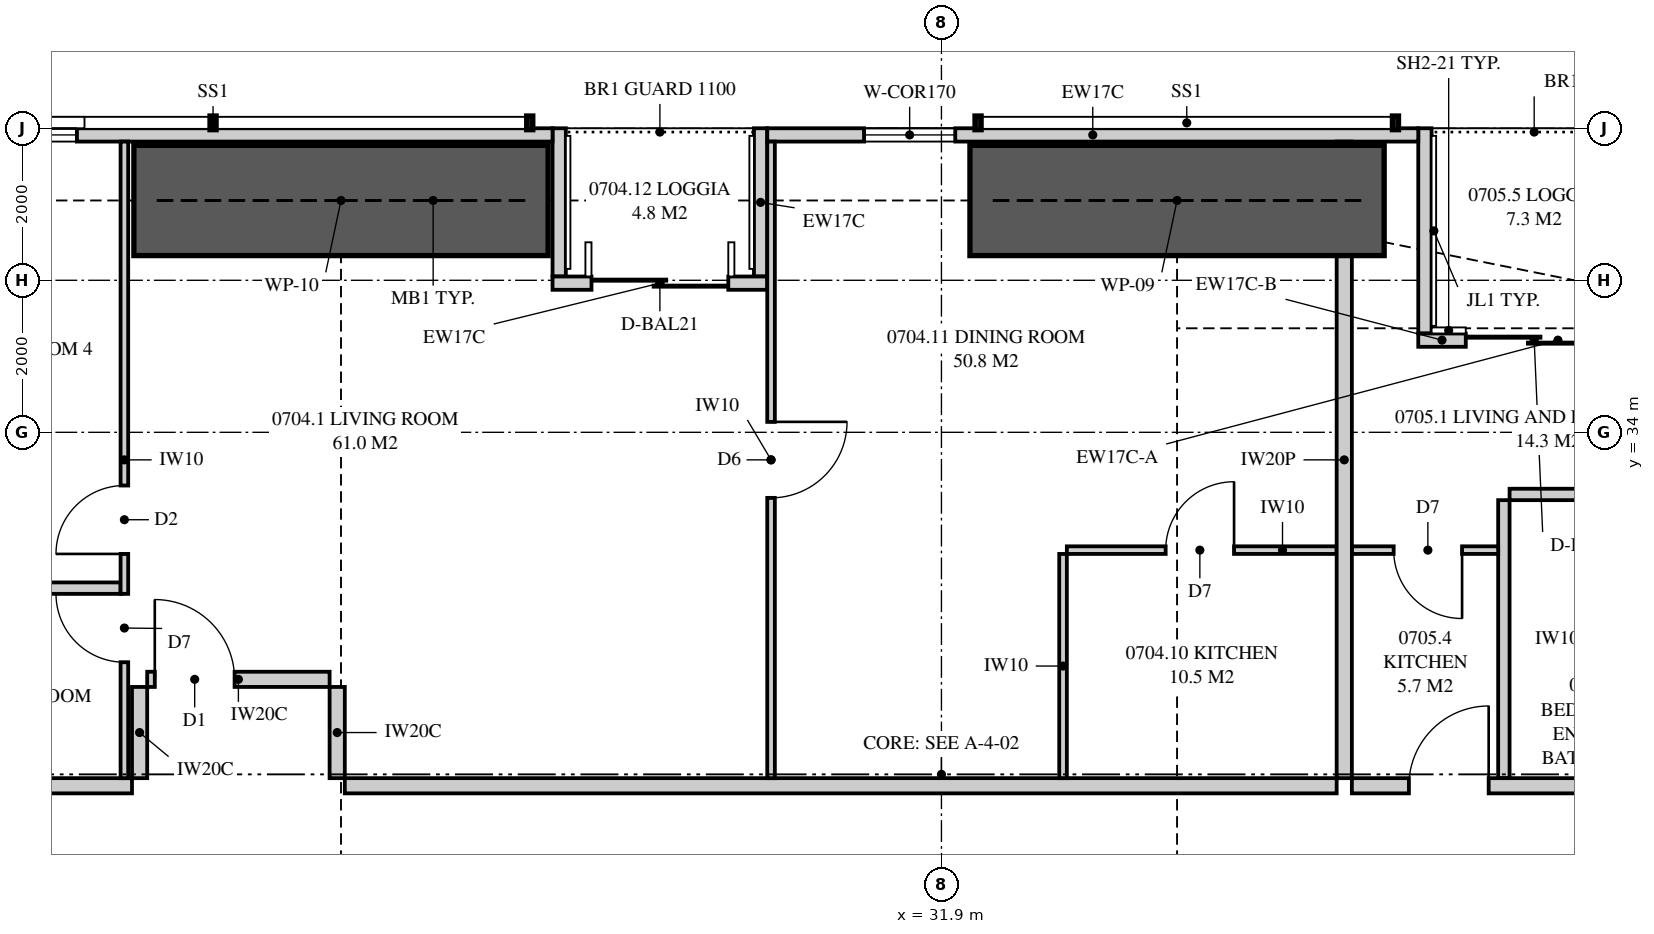
"""IFC4 building model, lengths in metres.
Left out: names, types, materials, properties, quantities, classifications, styles, units other than length and angle.
Written with IfcOpenShell. Run it as: python <this file> out.ifc"""

import sys

from ifc_helpers import new_model, si_unit, direction, frame, frame_2d, origin, place, context, subcontext, project, spatial, polyline, rectangle, outline, extrude, element, fill, save


model = new_model("IFC4")
c1 = context("Model", 3, precision=1e-05, world=origin(), true_north=direction((0.0, 1.0)))
c2 = subcontext(c1, "Body", "Model", "MODEL_VIEW")
j1 = project(units=[si_unit("LENGTHUNIT", "METRE"), si_unit("PLANEANGLEUNIT", "RADIAN")], contexts=[c1])
p1 = place(None, origin())
s1 = spatial("IfcSite", under=j1, at=p1, CompositionType="ELEMENT")
p2 = place(p1, origin())
s2 = spatial("IfcBuilding", under=s1, at=p2, CompositionType="ELEMENT")
p3 = place(p2, frame((0.0, 0.0, 31.05)))
s3 = spatial("IfcBuildingStorey", under=s2, at=p3, CompositionType="ELEMENT", Elevation=31.05)
p4 = place(p3, frame((38.174, 37.913, 0.0), z_axis=(0.0, 0.0, 1.0), x_axis=(-1.0, 0.0, 0.0)))
e1 = element("IfcWall", 1, at=p4, inside=s3, PredefinedType="SOLIDWALL", context=c2, shape_type="SweptSolid", body=[
    extrude(outline(polyline([(0.0, 0.0), (8.565, 0.0), (8.565, 2.15), (3.174, 2.15), (3.174, 3.11), (3.018, 3.11), (3.018, 2.15), (2.97, 2.15), (2.97, 3.11), (0.0, 3.11), (0.0, 0.0)])), frame((0.0, 0.087, 0.0), z_axis=(0.0, -1.0, 0.0), x_axis=(1.0, 0.0, 0.0)), (0.0, 0.0, 1.0), 0.175),
])
p5 = place(p4, frame((6.092, 0.0, 0.4)))
e2 = element("IfcOpeningElement", 2, at=p5, cuts=e1, PredefinedType="OPENING", context=c2, shape_type="SweptSolid", body=[
    extrude(rectangle(XDim=1.2, YDim=1.7, at=frame_2d((0.6, 0.85))), frame((0.0, 0.097, 0.0), z_axis=(0.0, -1.0, 0.0), x_axis=(1.0, 0.0, 0.0)), (0.0, 0.0, 1.0), 0.195),
])
p6 = place(p3, frame((26.783, 37.913, 0.0), z_axis=(0.0, 0.0, 1.0), x_axis=(-1.0, 0.0, 0.0)))
e3 = element("IfcWall", 3, at=p6, inside=s3, PredefinedType="SOLIDWALL", context=c2, shape_type="SweptSolid", body=[
    extrude(outline(polyline([(0.0, 0.0), (21.732, 0.0), (21.732, 3.11), (13.987, 3.11), (13.987, 2.15), (13.939, 2.15), (13.939, 3.11), (13.783, 3.11), (13.783, 2.15), (0.0, 2.15), (0.0, 0.0)])), frame((0.0, 0.087, 0.0), z_axis=(0.0, -1.0, 0.0), x_axis=(1.0, 0.0, 0.0)), (0.0, 0.0, 1.0), 0.175),
])
p7 = place(p6, frame((6.258, 0.0, 0.4)))
e4 = element("IfcOpeningElement", 4, at=p7, cuts=e3, PredefinedType="OPENING", context=c2, shape_type="SweptSolid", body=[
    extrude(rectangle(XDim=1.8, YDim=1.7, at=frame_2d((0.9, 0.85))), frame((0.0, 0.097, 0.0), z_axis=(0.0, -1.0, 0.0), x_axis=(1.0, 0.0, 0.0)), (0.0, 0.0, 1.0), 0.195),
])
p8 = place(p6, frame((9.126, 0.0, 0.4)))
e5 = element("IfcOpeningElement", 5, at=p8, cuts=e3, PredefinedType="OPENING", context=c2, shape_type="SweptSolid", body=[
    extrude(rectangle(XDim=1.8, YDim=1.7, at=frame_2d((0.9, 0.85))), frame((0.0, 0.097, 0.0), z_axis=(0.0, -1.0, 0.0), x_axis=(1.0, 0.0, 0.0)), (0.0, 0.0, 1.0), 0.195),
])
p9 = place(p6, frame((16.613, 0.0, 0.4)))
e6 = element("IfcOpeningElement", 6, at=p9, cuts=e3, PredefinedType="OPENING", context=c2, shape_type="SweptSolid", body=[
    extrude(rectangle(XDim=1.8, YDim=1.7, at=frame_2d((0.9, 0.85))), frame((0.0, 0.097, 0.0), z_axis=(0.0, -1.0, 0.0), x_axis=(1.0, 0.0, 0.0)), (0.0, 0.0, 1.0), 0.195),
])
p10 = place(p3, frame((41.224, 35.212, 0.0), z_axis=(0.0, 0.0, 1.0), x_axis=(-1.0, 0.0, 0.0)))
e7 = element("IfcWall", 7, at=p10, inside=s3, PredefinedType="SOLIDWALL", context=c2, shape_type="SweptSolid", body=[
    extrude(rectangle(XDim=2.425, YDim=0.175, at=frame_2d((1.212, 0.0))), origin(), (0.0, 0.0, 1.0), 2.15),
])
p11 = place(p10, frame((0.625, 0.0, 0.0)))
e8 = element("IfcOpeningElement", 8, at=p11, cuts=e7, PredefinedType="OPENING", context=c2, shape_type="SweptSolid", body=[
    extrude(rectangle(XDim=1.8, YDim=2.1, at=frame_2d((0.9, 1.05))), frame((0.0, 0.097, 0.0), z_axis=(0.0, -1.0, 0.0), x_axis=(1.0, 0.0, 0.0)), (0.0, 0.0, 1.0), 0.195),
])
p12 = place(p3, frame((38.799, 35.212, 0.0), z_axis=(0.0, 0.0, 1.0), x_axis=(-1.0, 0.0, 0.0)))
e9 = element("IfcWall", 9, at=p12, inside=s3, PredefinedType="SOLIDWALL", context=c2, shape_type="SweptSolid", body=[
    extrude(rectangle(XDim=0.625, YDim=0.175, at=frame_2d((0.312, 0.0))), origin(), (0.0, 0.0, 1.0), 2.51),
])
p13 = place(p3, frame((38.261, 38.0, 0.0), z_axis=(0.0, 0.0, 1.0), x_axis=(0.0, -1.0, 0.0)))
e10 = element("IfcWall", 10, at=p13, inside=s3, PredefinedType="SOLIDWALL", context=c2, shape_type="SweptSolid", body=[
    extrude(outline(polyline([(0.0, 0.0), (2.7, 0.0), (2.7, 2.51), (2.439, 2.51), (2.439, 2.15), (0.772, 2.15), (0.772, 3.11), (0.0, 3.11), (0.0, 0.0)])), frame((0.0, 0.087, 0.0), z_axis=(0.0, -1.0, 0.0), x_axis=(1.0, 0.0, 0.0)), (0.0, 0.0, 1.0), 0.175),
])
p14 = place(p3, frame((29.608, 35.962, 0.0), z_axis=(0.0, 0.0, 1.0), x_axis=(-1.0, 0.0, 0.0)))
e11 = element("IfcWall", 11, at=p14, inside=s3, PredefinedType="SOLIDWALL", context=c2, shape_type="SweptSolid", body=[
    extrude(rectangle(XDim=2.825, YDim=0.175, at=frame_2d((1.413, 0.0))), origin(), (0.0, 0.0, 1.0), 3.11),
])
p15 = place(p14, frame((0.512, 0.0, 0.0)))
e12 = element("IfcOpeningElement", 12, at=p15, cuts=e11, PredefinedType="OPENING", context=c2, shape_type="SweptSolid", body=[
    extrude(rectangle(XDim=1.8, YDim=2.1, at=frame_2d((0.9, 1.05))), frame((0.0, 0.097, 0.0), z_axis=(0.0, -1.0, 0.0), x_axis=(1.0, 0.0, 0.0)), (0.0, 0.0, 1.0), 0.195),
])
for number, where, z_axis, x_axis in (
    (13, (29.521, 38.0, 0.0), (0.0, 0.0, 1.0), (0.0, -1.0, 0.0)),
    (14, (26.871, 38.0, 0.0), (0.0, 0.0, 1.0), (0.0, -1.0, 0.0)),
):
    element("IfcWall", number, at=place(p3, frame(where, z_axis=z_axis, x_axis=x_axis)), inside=s3, PredefinedType="SOLIDWALL", context=c2, shape_type="SweptSolid", body=[
        extrude(outline(polyline([(0.0, 0.0), (1.95, 0.0), (1.95, 3.11), (1.75, 3.11), (1.75, 2.15), (0.15, 2.15), (0.15, 3.11), (0.0, 3.11), (0.0, 0.0)])), frame((0.0, 0.087, 0.0), z_axis=(0.0, -1.0, 0.0), x_axis=(1.0, 0.0, 0.0)), (0.0, 0.0, 1.0), 0.175),
    ])
p16 = place(p3, frame((37.2, 37.825, 0.0), z_axis=(0.0, 0.0, 1.0), x_axis=(0.0, -1.0, 0.0)))
e15 = element("IfcWall", 15, at=p16, inside=s3, PredefinedType="PARTITIONING", context=c2, shape_type="SweptSolid", body=[
    extrude(outline(polyline([(0.0, 0.0), (8.375, 0.0), (8.375, 3.11), (3.766, 3.11), (3.766, 2.51), (2.145, 2.51), (2.145, 2.15), (0.289, 2.15), (0.289, 3.11), (0.0, 3.11), (0.0, 0.0)])), frame((0.0, 0.1, 0.0), z_axis=(0.0, -1.0, 0.0), x_axis=(1.0, 0.0, 0.0)), (0.0, 0.0, 1.0), 0.2),
])
p17 = place(p3, frame((17.725, 29.35, 0.0), z_axis=(0.0, 0.0, 1.0), x_axis=(1.0, 0.0, 0.0)))
e16 = element("IfcWall", 16, at=p17, inside=s3, PredefinedType="PARTITIONING", context=c2, shape_type="SweptSolid", body=[
    extrude(rectangle(XDim=3.525, YDim=0.2, at=frame_2d((1.762, 0.0))), origin(), (0.0, 0.0, 1.0), 3.11),
])
p18 = place(p3, frame((21.15, 37.825, 0.0), z_axis=(0.0, 0.0, 1.0), x_axis=(0.0, -1.0, 0.0)))
e17 = element("IfcWall", 17, at=p18, inside=s3, PredefinedType="PARTITIONING", context=c2, shape_type="SweptSolid", body=[
    extrude(outline(polyline([(0.0, 0.0), (8.375, 0.0), (8.375, 3.11), (1.635, 3.11), (1.635, 2.15), (0.0, 2.15), (0.0, 3.11), (0.0, 0.0)])), frame((0.0, 0.05, 0.0), z_axis=(0.0, -1.0, 0.0), x_axis=(1.0, 0.0, 0.0)), (0.0, 0.0, 1.0), 0.1),
])
p19 = place(p18, frame((4.525, 0.0, 0.0)))
e18 = element("IfcOpeningElement", 18, at=p19, cuts=e17, PredefinedType="OPENING", context=c2, shape_type="SweptSolid", body=[
    extrude(rectangle(XDim=0.9, YDim=2.1, at=frame_2d((0.45, 1.05))), frame((0.0, 0.06, 0.0), z_axis=(0.0, -1.0, 0.0), x_axis=(1.0, 0.0, 0.0)), (0.0, 0.0, 1.0), 0.12),
])
p20 = place(p18, frame((5.95, 0.0, 0.0)))
e19 = element("IfcOpeningElement", 19, at=p20, cuts=e17, PredefinedType="OPENING", context=c2, shape_type="SweptSolid", body=[
    extrude(rectangle(XDim=0.9, YDim=2.1, at=frame_2d((0.45, 1.05))), frame((0.0, 0.06, 0.0), z_axis=(0.0, -1.0, 0.0), x_axis=(1.0, 0.0, 0.0)), (0.0, 0.0, 1.0), 0.12),
])
p21 = place(p3, frame((18.15, 31.95, 0.0), z_axis=(0.0, 0.0, 1.0), x_axis=(1.0, 0.0, 0.0)))
e20 = element("IfcWall", 20, at=p21, inside=s3, PredefinedType="PLUMBINGWALL", context=c2, shape_type="SweptSolid", body=[
    extrude(rectangle(XDim=2.95, YDim=0.15, at=frame_2d((1.475, 0.0))), origin(), (0.0, 0.0, 1.0), 3.11),
])
p22 = place(p3, frame((33.55, 32.45, 0.0), z_axis=(0.0, 0.0, 1.0), x_axis=(1.0, 0.0, 0.0)))
e21 = element("IfcWall", 21, at=p22, inside=s3, PredefinedType="PARTITIONING", context=c2, shape_type="SweptSolid", body=[
    extrude(outline(polyline([(0.0, 0.0), (3.55, 0.0), (3.55, 3.11), (1.737, 3.11), (1.737, 2.541), (1.163, 2.541), (1.163, 3.11), (0.0, 3.11), (0.0, 0.0)])), frame((0.0, 0.05, 0.0), z_axis=(0.0, -1.0, 0.0), x_axis=(1.0, 0.0, 0.0)), (0.0, 0.0, 1.0), 0.1),
])
p23 = place(p22, frame((1.3, 0.0, 0.0)))
e22 = element("IfcOpeningElement", 22, at=p23, cuts=e21, PredefinedType="OPENING", context=c2, shape_type="SweptSolid", body=[
    extrude(rectangle(XDim=0.9, YDim=2.1, at=frame_2d((0.45, 1.05))), frame((0.0, 0.06, 0.0), z_axis=(0.0, -1.0, 0.0), x_axis=(1.0, 0.0, 0.0)), (0.0, 0.0, 1.0), 0.12),
])
p24 = place(p3, frame((33.5, 32.4, 0.0), z_axis=(0.0, 0.0, 1.0), x_axis=(0.0, -1.0, 0.0)))
e23 = element("IfcWall", 23, at=p24, inside=s3, PredefinedType="PARTITIONING", context=c2, shape_type="SweptSolid", body=[
    extrude(rectangle(XDim=2.95, YDim=0.1, at=frame_2d((1.475, 0.0))), origin(), (0.0, 0.0, 1.0), 3.11),
])
p25 = place(p3, frame((29.658, 37.825, 0.0), z_axis=(0.0, 0.0, 1.0), x_axis=(0.0, -1.0, 0.0)))
e24 = element("IfcWall", 24, at=p25, inside=s3, PredefinedType="PARTITIONING", context=c2, shape_type="SweptSolid", body=[
    extrude(outline(polyline([(0.0, 0.0), (8.375, 0.0), (8.375, 3.11), (1.635, 3.11), (1.635, 2.15), (0.0, 2.15), (0.0, 3.11), (0.0, 0.0)])), frame((0.0, 0.05, 0.0), z_axis=(0.0, -1.0, 0.0), x_axis=(1.0, 0.0, 0.0)), (0.0, 0.0, 1.0), 0.1),
])
p26 = place(p25, frame((3.688, 0.0, 0.0)))
e25 = element("IfcOpeningElement", 25, at=p26, cuts=e24, PredefinedType="OPENING", context=c2, shape_type="SweptSolid", body=[
    extrude(rectangle(XDim=1.0, YDim=2.1, at=frame_2d((0.5, 1.05))), frame((0.0, 0.06, 0.0), z_axis=(0.0, -1.0, 0.0), x_axis=(1.0, 0.0, 0.0)), (0.0, 0.0, 1.0), 0.12),
])
p27 = place(p3, frame((37.3, 29.35, 0.0), z_axis=(0.0, 0.0, 1.0), x_axis=(1.0, 0.0, 0.0)))
e26 = element("IfcWall", 26, at=p27, inside=s3, PredefinedType="PARTITIONING", context=c2, shape_type="SweptSolid", body=[
    extrude(outline(polyline([(0.0, 0.0), (8.7, 0.0), (8.7, 3.11), (7.967, 3.11), (7.967, 2.15), (6.123, 2.15), (6.123, 3.11), (0.0, 3.11), (0.0, 0.0)])), frame((0.0, 0.1, 0.0), z_axis=(0.0, -1.0, 0.0), x_axis=(1.0, 0.0, 0.0)), (0.0, 0.0, 1.0), 0.2),
])
p28 = place(p27, frame((0.75, 0.0, 0.0)))
e27 = element("IfcOpeningElement", 27, at=p28, cuts=e26, PredefinedType="OPENING", context=c2, shape_type="SweptSolid", body=[
    extrude(rectangle(XDim=1.05, YDim=2.2, at=frame_2d((0.525, 1.1))), frame((0.0, 0.11, 0.0), z_axis=(0.0, -1.0, 0.0), x_axis=(1.0, 0.0, 0.0)), (0.0, 0.0, 1.0), 0.22),
])
p29 = place(p3, frame((39.375, 33.183, 0.0), z_axis=(0.0, 0.0, 1.0), x_axis=(1.0, 0.0, 0.0)))
e28 = element("IfcWall", 28, at=p29, inside=s3, PredefinedType="PLUMBINGWALL", context=c2, shape_type="SweptSolid", body=[
    extrude(rectangle(XDim=2.275, YDim=0.15, at=frame_2d((1.137, 0.0))), origin(), (0.0, 0.0, 1.0), 3.11),
])
p30 = place(p3, frame((39.3, 33.108, 0.0), z_axis=(0.0, 0.0, 1.0), x_axis=(0.0, -1.0, 0.0)))
e29 = element("IfcWall", 29, at=p30, inside=s3, PredefinedType="PLUMBINGWALL", context=c2, shape_type="SweptSolid", body=[
    extrude(rectangle(XDim=3.658, YDim=0.15, at=frame_2d((1.829, 0.0))), origin(), (0.0, 0.0, 1.0), 3.11),
])
p31 = place(p3, frame((37.3, 32.45, 0.0), z_axis=(0.0, 0.0, 1.0), x_axis=(1.0, 0.0, 0.0)))
e30 = element("IfcWall", 30, at=p31, inside=s3, PredefinedType="PARTITIONING", context=c2, shape_type="SweptSolid", body=[
    extrude(rectangle(XDim=1.925, YDim=0.1, at=frame_2d((0.962, 0.0))), origin(), (0.0, 0.0, 1.0), 3.11),
])
p32 = place(p31, frame((0.55, 0.0, 0.0)))
e31 = element("IfcOpeningElement", 31, at=p32, cuts=e30, PredefinedType="OPENING", context=c2, shape_type="SweptSolid", body=[
    extrude(rectangle(XDim=0.9, YDim=2.1, at=frame_2d((0.45, 1.05))), frame((0.0, 0.06, 0.0), z_axis=(0.0, -1.0, 0.0), x_axis=(1.0, 0.0, 0.0)), (0.0, 0.0, 1.0), 0.12),
])
p33 = place(p3, frame((24.05, 29.35, 0.0), z_axis=(0.0, 0.0, 1.0), x_axis=(1.0, 0.0, 0.0)))
e32 = element("IfcWall", 32, at=p33, inside=s3, PredefinedType="PARTITIONING", context=c2, shape_type="SweptSolid", body=[
    extrude(outline(polyline([(0.0, 0.0), (13.05, 0.0), (13.05, 3.11), (11.287, 3.11), (11.287, 2.541), (10.613, 2.541), (10.613, 3.11), (0.287, 3.11), (0.287, 2.541), (0.0, 2.541), (0.0, 3.11), (0.0, 0.0)])), frame((0.0, 0.1, 0.0), z_axis=(0.0, -1.0, 0.0), x_axis=(1.0, 0.0, 0.0)), (0.0, 0.0, 1.0), 0.2),
])
p34 = place(p3, frame((21.45, 30.75, 0.0), z_axis=(0.0, 0.0, 1.0), x_axis=(1.0, 0.0, 0.0)))
e33 = element("IfcWall", 33, at=p34, inside=s3, PredefinedType="PARTITIONING", context=c2, shape_type="SweptSolid", body=[
    extrude(outline(polyline([(0.0, 0.0), (2.4, 0.0), (2.4, 3.11), (2.4, 2.541), (2.213, 2.541), (2.213, 3.11), (0.0, 3.11), (0.0, 0.0)])), frame((0.0, 0.1, 0.0), z_axis=(0.0, -1.0, 0.0), x_axis=(1.0, 0.0, 0.0)), (0.0, 0.0, 1.0), 0.2),
])
p35 = place(p34, frame((0.1, 0.0, 0.0)))
e34 = element("IfcOpeningElement", 34, at=p35, cuts=e33, PredefinedType="OPENING", context=c2, shape_type="SweptSolid", body=[
    extrude(rectangle(XDim=1.05, YDim=2.2, at=frame_2d((0.525, 1.1))), frame((0.0, 0.11, 0.0), z_axis=(0.0, -1.0, 0.0), x_axis=(1.0, 0.0, 0.0)), (0.0, 0.0, 1.0), 0.22),
])
p36 = place(p3, frame((21.35, 29.45, 0.0), z_axis=(0.0, 0.0, 1.0), x_axis=(0.0, 1.0, 0.0)))
e35 = element("IfcWall", 35, at=p36, inside=s3, PredefinedType="PARTITIONING", context=c2, shape_type="SweptSolid", body=[
    extrude(rectangle(XDim=1.2, YDim=0.2, at=frame_2d((0.6, 0.0))), origin(), (0.0, 0.0, 1.0), 3.11),
])
p37 = place(p3, frame((23.95, 29.45, 0.0), z_axis=(0.0, 0.0, 1.0), x_axis=(0.0, 1.0, 0.0)))
e36 = element("IfcWall", 36, at=p37, inside=s3, PredefinedType="PARTITIONING", context=c2, shape_type="SweptSolid", body=[
    extrude(outline(polyline([(0.0, 0.0), (1.2, 0.0), (1.2, 3.11), (1.2, 2.541), (0.0, 2.541), (0.0, 3.11), (0.0, 0.0)])), frame((0.0, 0.1, 0.0), z_axis=(0.0, -1.0, 0.0), x_axis=(1.0, 0.0, 0.0)), (0.0, 0.0, 1.0), 0.2),
])
for number, where, z_axis, x_axis in (
    (37, (32.275, 37.05, 0.0), (0.0, 0.0, 1.0), (1.0, 0.0, 0.0)),
    (38, (21.275, 37.05, 0.0), (0.0, 0.0, 1.0), (1.0, 0.0, 0.0)),
):
    element("IfcWall", number, at=place(p3, frame(where, z_axis=z_axis, x_axis=x_axis)), inside=s3, PredefinedType="SHEAR", context=c2, shape_type="SweptSolid", body=[
        extrude(rectangle(XDim=5.45, YDim=1.45, at=frame_2d((2.725, 0.0))), origin(), (0.0, 0.0, 1.0), 3.35),
    ])
p38 = place(p11, origin())
e39 = element("IfcDoor", 39, at=p38, inside=s3, OperationType="SLIDING_TO_LEFT", PredefinedType="DOOR", context=c2, shape_type="SweptSolid", body=[
    extrude(rectangle(XDim=1.8, YDim=2.1, at=frame_2d((0.9, 1.05))), frame((0.0, 0.025, 0.0), z_axis=(0.0, -1.0, 0.0), x_axis=(1.0, 0.0, 0.0)), (0.0, 0.0, 1.0), 0.05),
])
fill(e8, e39)
p39 = place(p5, origin())
e40 = element("IfcWindow", 40, at=p39, inside=s3, PartitioningType="SINGLE_PANEL", PredefinedType="WINDOW", context=c2, shape_type="SweptSolid", body=[
    extrude(rectangle(XDim=1.2, YDim=1.7, at=frame_2d((0.6, 0.85))), frame((0.0, 0.03, 0.0), z_axis=(0.0, -1.0, 0.0), x_axis=(1.0, 0.0, 0.0)), (0.0, 0.0, 1.0), 0.06),
])
fill(e2, e40)
p40 = place(p15, origin())
e41 = element("IfcDoor", 41, at=p40, inside=s3, OperationType="SLIDING_TO_LEFT", PredefinedType="DOOR", context=c2, shape_type="SweptSolid", body=[
    extrude(rectangle(XDim=1.8, YDim=2.1, at=frame_2d((0.9, 1.05))), frame((0.0, 0.025, 0.0), z_axis=(0.0, -1.0, 0.0), x_axis=(1.0, 0.0, 0.0)), (0.0, 0.0, 1.0), 0.05),
])
fill(e12, e41)
p41 = place(p7, origin())
e42 = element("IfcWindow", 42, at=p41, inside=s3, PartitioningType="SINGLE_PANEL", PredefinedType="WINDOW", context=c2, shape_type="SweptSolid", body=[
    extrude(rectangle(XDim=1.8, YDim=1.7, at=frame_2d((0.9, 0.85))), frame((0.0, 0.03, 0.0), z_axis=(0.0, -1.0, 0.0), x_axis=(1.0, 0.0, 0.0)), (0.0, 0.0, 1.0), 0.06),
])
fill(e4, e42)
p42 = place(p35, origin())
e43 = element("IfcDoor", 43, at=p42, inside=s3, OperationType="SINGLE_SWING_LEFT", PredefinedType="DOOR", context=c2, shape_type="SweptSolid", body=[
    extrude(rectangle(XDim=1.05, YDim=2.2, at=frame_2d((0.525, 1.1))), frame((0.0, 0.025, 0.0), z_axis=(0.0, -1.0, 0.0), x_axis=(1.0, 0.0, 0.0)), (0.0, 0.0, 1.0), 0.05),
])
fill(e34, e43)
p43 = place(p19, frame((0.9, 0.0, 0.0), z_axis=(0.0, 0.0, 1.0), x_axis=(-1.0, 0.0, 0.0)))
e44 = element("IfcDoor", 44, at=p43, inside=s3, OperationType="SINGLE_SWING_LEFT", PredefinedType="DOOR", context=c2, shape_type="SweptSolid", body=[
    extrude(rectangle(XDim=0.9, YDim=2.1, at=frame_2d((0.45, 1.05))), frame((0.0, 0.025, 0.0), z_axis=(0.0, -1.0, 0.0), x_axis=(1.0, 0.0, 0.0)), (0.0, 0.0, 1.0), 0.05),
])
fill(e18, e44)
p44 = place(p20, frame((0.9, 0.0, 0.0), z_axis=(0.0, 0.0, 1.0), x_axis=(-1.0, 0.0, 0.0)))
e45 = element("IfcDoor", 45, at=p44, inside=s3, OperationType="SINGLE_SWING_RIGHT", PredefinedType="DOOR", context=c2, shape_type="SweptSolid", body=[
    extrude(rectangle(XDim=0.9, YDim=2.1, at=frame_2d((0.45, 1.05))), frame((0.0, 0.025, 0.0), z_axis=(0.0, -1.0, 0.0), x_axis=(1.0, 0.0, 0.0)), (0.0, 0.0, 1.0), 0.05),
])
fill(e19, e45)
p45 = place(p23, origin())
e46 = element("IfcDoor", 46, at=p45, inside=s3, OperationType="SINGLE_SWING_RIGHT", PredefinedType="DOOR", context=c2, shape_type="SweptSolid", body=[
    extrude(rectangle(XDim=0.9, YDim=2.1, at=frame_2d((0.45, 1.05))), frame((0.0, 0.025, 0.0), z_axis=(0.0, -1.0, 0.0), x_axis=(1.0, 0.0, 0.0)), (0.0, 0.0, 1.0), 0.05),
])
fill(e22, e46)
p46 = place(p26, origin())
e47 = element("IfcDoor", 47, at=p46, inside=s3, OperationType="SINGLE_SWING_LEFT", PredefinedType="DOOR", context=c2, shape_type="SweptSolid", body=[
    extrude(rectangle(XDim=1.0, YDim=2.1, at=frame_2d((0.5, 1.05))), frame((0.0, 0.025, 0.0), z_axis=(0.0, -1.0, 0.0), x_axis=(1.0, 0.0, 0.0)), (0.0, 0.0, 1.0), 0.05),
])
fill(e25, e47)
p47 = place(p28, origin())
e48 = element("IfcDoor", 48, at=p47, inside=s3, OperationType="SINGLE_SWING_RIGHT", PredefinedType="DOOR", context=c2, shape_type="SweptSolid", body=[
    extrude(rectangle(XDim=1.05, YDim=2.2, at=frame_2d((0.525, 1.1))), frame((0.0, 0.025, 0.0), z_axis=(0.0, -1.0, 0.0), x_axis=(1.0, 0.0, 0.0)), (0.0, 0.0, 1.0), 0.05),
])
fill(e27, e48)
p48 = place(p32, frame((0.9, 0.0, 0.0), z_axis=(0.0, 0.0, 1.0), x_axis=(-1.0, 0.0, 0.0)))
e49 = element("IfcDoor", 49, at=p48, inside=s3, OperationType="SINGLE_SWING_LEFT", PredefinedType="DOOR", context=c2, shape_type="SweptSolid", body=[
    extrude(rectangle(XDim=0.9, YDim=2.1, at=frame_2d((0.45, 1.05))), frame((0.0, 0.025, 0.0), z_axis=(0.0, -1.0, 0.0), x_axis=(1.0, 0.0, 0.0)), (0.0, 0.0, 1.0), 0.05),
])
fill(e31, e49)
save(model, sys.argv[1])
